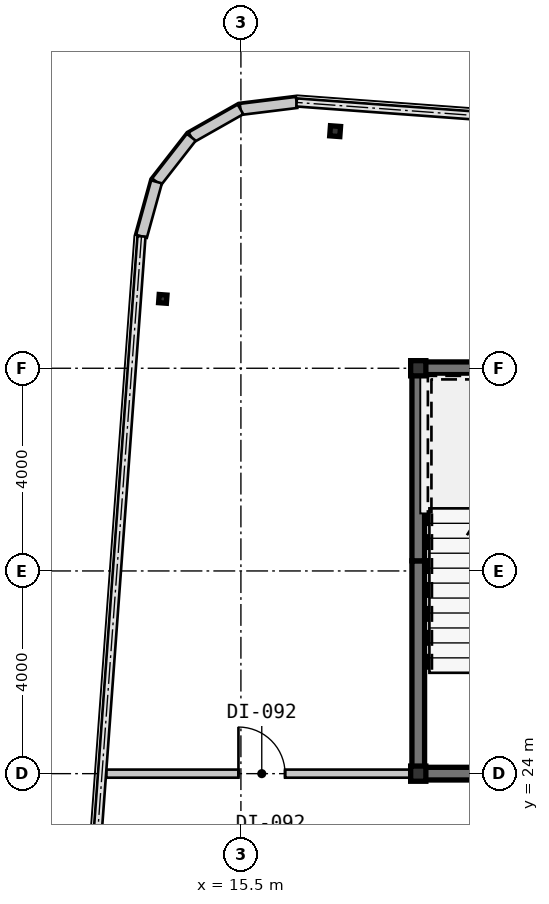
"""IFC4 building model, lengths in metres.
Left out: names, types, materials, properties, quantities, classifications, styles, units other than length and angle.
Written with IfcOpenShell. Run it as: python <this file> out.ifc"""

import sys

from ifc_helpers import new_model, si_unit, direction, frame, frame_2d, origin, origin_2d, place, context, subcontext, project, spatial, rectangle, hollow_rectangle, i_section, extrude, source, transform, mapped, element, fill, save


model = new_model("IFC4")
c1 = context("Model", 3, precision=1e-05, world=origin(), true_north=direction((0.0, 1.0)))
c2 = subcontext(c1, "Body", "Model", "MODEL_VIEW")
j1 = project(units=[si_unit("LENGTHUNIT", "METRE"), si_unit("PLANEANGLEUNIT", "RADIAN")], contexts=[c1])
p1 = place(None, origin())
s1 = spatial("IfcSite", under=j1, at=p1, CompositionType="ELEMENT")
p2 = place(p1, origin())
s2 = spatial("IfcBuilding", under=s1, at=p2, CompositionType="ELEMENT")
p3 = place(p2, frame((0.0, 0.0, 246.05)))
s3 = spatial("IfcBuildingStorey", under=s2, at=p3, CompositionType="ELEMENT", Elevation=246.05)
m1 = source(origin(), c2, "Body", "SweptSolid", [
    extrude(hollow_rectangle(XDim=0.3, YDim=0.3, WallThickness=0.012, at=origin_2d()), origin(), (0.0, 0.0, 1.0), 3.15),
])
for number, where, z_axis, x_axis in (
    (1, (19.0, 24.0, 0.0), (0.0, 0.0, 1.0), (1.0, 0.0, 0.0)),
    (2, (19.0, 32.0, 0.0), (0.0, 0.0, 1.0), (1.0, 0.0, 0.0)),
):
    element("IfcColumn", number, at=place(p3, frame(where, z_axis=z_axis, x_axis=x_axis)), inside=s3, PredefinedType="COLUMN", context=c2, shape_type="MappedRepresentation", body=[
        mapped(m1, transform((0.0, 0.0, 0.0), scale=1.0)),
    ])
m2 = source(origin(), c2, "Body", "SweptSolid", [
    extrude(hollow_rectangle(XDim=0.2, YDim=0.2, WallThickness=0.009, at=origin_2d()), origin(), (0.0, 0.0, 1.0), 3.15),
])
p4 = place(p3, frame((17.36, 36.679, 0.0), z_axis=(0.0, 0.0, 1.0), x_axis=(0.997314477224, -0.073238197128, 0.0)))
e3 = element("IfcColumn", 3, at=p4, inside=s3, PredefinedType="COLUMN", context=c2, shape_type="MappedRepresentation", body=[
    mapped(m2, transform((0.0, 0.0, 0.0), scale=1.0)),
])
m3 = source(origin(), c2, "Body", "SweptSolid", [
    extrude(i_section(OverallWidth=0.154, OverallDepth=0.162, WebThickness=0.008, FlangeThickness=0.011, at=origin_2d()), origin(), (0.0, 0.0, 1.0), 3.15),
])
p5 = place(p3, frame((13.958, 33.369, 0.0), z_axis=(0.0, 0.0, 1.0), x_axis=(0.997314477224, -0.073238197128, 0.0)))
e4 = element("IfcColumn", 4, at=p5, inside=s3, PredefinedType="COLUMN", context=c2, shape_type="MappedRepresentation", body=[
    mapped(m3, transform((0.0, 0.0, 0.0), scale=1.0)),
])
m4 = source(origin(), c2, "Body", "SweptSolid", [
    extrude(rectangle(XDim=1.116, YDim=0.22, at=frame_2d((0.558, 0.0))), origin(), (0.0, 0.0, 1.0), 2.93),
])
p6 = place(p3, frame((16.599, 37.246, 0.0), z_axis=(0.0, 0.0, 1.0), x_axis=(-0.992441899189, -0.122715429897, 0.0)))
e5 = element("IfcWall", 5, at=p6, inside=s3, PredefinedType="SOLIDWALL", context=c2, shape_type="MappedRepresentation", body=[
    mapped(m4, transform((0.0, 0.0, 0.0), scale=1.0)),
])
m5 = source(origin(), c2, "Body", "SweptSolid", [
    extrude(rectangle(XDim=1.116, YDim=0.22, at=frame_2d((0.558, 0.0))), origin(), (0.0, 0.0, 1.0), 2.93),
])
p7 = place(p3, frame((15.492, 37.109, 0.0), z_axis=(0.0, 0.0, 1.0), x_axis=(-0.869934579941, -0.493167138628, 0.0)))
e6 = element("IfcWall", 6, at=p7, inside=s3, PredefinedType="SOLIDWALL", context=c2, shape_type="MappedRepresentation", body=[
    mapped(m5, transform((0.0, 0.0, 0.0), scale=1.0)),
])
m6 = source(origin(), c2, "Body", "SweptSolid", [
    extrude(rectangle(XDim=1.116, YDim=0.22, at=frame_2d((0.558, 0.0))), origin(), (0.0, 0.0, 1.0), 2.93),
])
p8 = place(p3, frame((14.521, 36.559, 0.0), z_axis=(0.0, 0.0, 1.0), x_axis=(-0.614909386406, -0.788597772321, 0.0)))
e7 = element("IfcWall", 7, at=p8, inside=s3, PredefinedType="SOLIDWALL", context=c2, shape_type="MappedRepresentation", body=[
    mapped(m6, transform((0.0, 0.0, 0.0), scale=1.0)),
])
p9 = place(p3, frame((13.835, 35.679, 0.0), z_axis=(0.0, 0.0, 1.0), x_axis=(-0.266300605026, -0.963890028874, 0.0)))
e8 = element("IfcWall", 8, at=p9, inside=s3, PredefinedType="SOLIDWALL", context=c2, shape_type="MappedRepresentation", body=[
    mapped(m5, transform((0.0, 0.0, 0.0), scale=1.0)),
])
m7 = source(origin(), c2, "Body", "SweptSolid", [
    extrude(rectangle(XDim=9.125, YDim=0.25, at=frame_2d((4.562, 0.0))), origin(), (0.0, 0.0, 1.0), 2.93),
])
p10 = place(p3, frame((18.875, 32.0, 0.0), z_axis=(0.0, 0.0, 1.0), x_axis=(1.0, 0.0, 0.0)))
e9 = element("IfcWall", 9, at=p10, inside=s3, PredefinedType="SHEAR", context=c2, shape_type="MappedRepresentation", body=[
    mapped(m7, transform((0.0, 0.0, 0.0), scale=1.0)),
])
m8 = source(origin(), c2, "Body", "SweptSolid", [
    extrude(rectangle(XDim=4.075, YDim=0.25, at=frame_2d((2.038, 0.0))), origin(), (0.0, 0.0, 1.0), 2.93),
])
p11 = place(p3, frame((19.0, 24.125, 0.0), z_axis=(0.0, 0.0, 1.0), x_axis=(0.0, 1.0, 0.0)))
e10 = element("IfcWall", 10, at=p11, inside=s3, PredefinedType="SHEAR", context=c2, shape_type="MappedRepresentation", body=[
    mapped(m8, transform((0.0, 0.0, 0.0), scale=1.0)),
])
m9 = source(origin(), c2, "Body", "SweptSolid", [
    extrude(rectangle(XDim=3.675, YDim=0.25, at=frame_2d((1.837, 0.0))), origin(), (0.0, 0.0, 1.0), 2.93),
])
p12 = place(p3, frame((19.0, 28.2, 0.0), z_axis=(0.0, 0.0, 1.0), x_axis=(0.0, 1.0, 0.0)))
e11 = element("IfcWall", 11, at=p12, inside=s3, PredefinedType="SHEAR", context=c2, shape_type="MappedRepresentation", body=[
    mapped(m9, transform((0.0, 0.0, 0.0), scale=1.0)),
])
m10 = source(origin(), c2, "Body", "SweptSolid", [
    extrude(rectangle(XDim=4.85, YDim=0.25, at=frame_2d((2.425, 0.0))), origin(), (0.0, 0.0, 1.0), 2.93),
])
p13 = place(p3, frame((18.875, 24.0, 0.0), z_axis=(0.0, 0.0, 1.0), x_axis=(1.0, 0.0, 0.0)))
e12 = element("IfcWall", 12, at=p13, inside=s3, PredefinedType="SHEAR", context=c2, shape_type="MappedRepresentation", body=[
    mapped(m10, transform((0.0, 0.0, 0.0), scale=1.0)),
])
m11 = source(origin(), c2, "Body", "SweptSolid", [
    extrude(rectangle(XDim=6.032, YDim=0.16, at=frame_2d((3.016, 0.0))), origin(), (0.0, 0.0, 1.0), 2.93),
])
p14 = place(p3, frame((12.843, 24.0, 0.0), z_axis=(0.0, 0.0, 1.0), x_axis=(1.0, 0.0, 0.0)))
e13 = element("IfcWall", 13, at=p14, inside=s3, PredefinedType="PARTITIONING", context=c2, shape_type="MappedRepresentation", body=[
    mapped(m11, transform((0.0, 0.0, 0.0), scale=1.0)),
])
m12 = source(origin(), c2, "Body", "SweptSolid", [
    extrude(rectangle(XDim=0.92, YDim=2.1, at=frame_2d((0.46, 1.05))), frame((0.0, 0.09, 0.0), z_axis=(0.0, -1.0, 0.0), x_axis=(1.0, 0.0, 0.0)), (0.0, 0.0, 1.0), 0.18),
])
p15 = place(p14, frame((2.608, 0.0, 0.0)))
e14 = element("IfcOpeningElement", 14, at=p15, cuts=e13, PredefinedType="OPENING", context=c2, shape_type="MappedRepresentation", body=[
    mapped(m12, transform((0.0, 0.0, 0.0), scale=1.0)),
])
m13 = source(origin(), c2, "Body", "SweptSolid", [
    extrude(rectangle(XDim=0.92, YDim=2.1, at=frame_2d((0.46, 1.05))), frame((0.0, 0.025, 0.0), z_axis=(0.0, -1.0, 0.0), x_axis=(1.0, 0.0, 0.0)), (0.0, 0.0, 1.0), 0.05),
])
p16 = place(p15, origin())
e15 = element("IfcDoor", 15, at=p16, inside=s3, OperationType="SINGLE_SWING_LEFT", PredefinedType="DOOR", context=c2, shape_type="MappedRepresentation", body=[
    mapped(m13, transform((0.0, 0.0, 0.0), scale=1.0)),
])
fill(e14, e15)
save(model, sys.argv[1])
